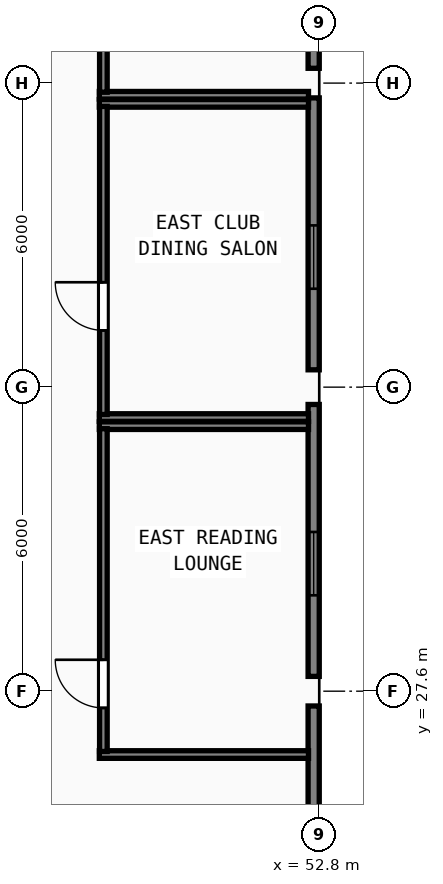
"""IFC4 building model, lengths in metres.
Left out: names, types, materials, properties, quantities, classifications, styles, units other than length and angle.
Written with IfcOpenShell. Run it as: python <this file> out.ifc"""

import sys

from ifc_helpers import new_model, si_unit, direction, frame, frame_2d, origin, origin_2d, place, context, subcontext, project, spatial, rectangle, hollow_rectangle, extrude, element, fill, save


model = new_model("IFC4")
c1 = context("Model", 3, precision=1e-05, world=origin(), true_north=direction((0.0, 1.0)))
c2 = subcontext(c1, "Body", "Model", "MODEL_VIEW")
j1 = project(units=[si_unit("LENGTHUNIT", "METRE"), si_unit("PLANEANGLEUNIT", "RADIAN")], contexts=[c1])
p1 = place(None, origin())
s1 = spatial("IfcSite", under=j1, at=p1, CompositionType="ELEMENT")
p2 = place(p1, origin())
s2 = spatial("IfcBuilding", under=s1, at=p2, CompositionType="ELEMENT")
p3 = place(p2, frame((0.0, 0.0, 282.2)))
s3 = spatial("IfcBuildingStorey", under=s2, at=p3, CompositionType="ELEMENT", Elevation=282.2)
p4 = place(p3, frame((52.8, 33.6, 0.0), z_axis=(0.0, 0.0, 1.0), x_axis=(1.0, 0.0, 0.0)))
e1 = element("IfcColumn", 1, at=p4, inside=s3, PredefinedType="COLUMN", context=c2, shape_type="SweptSolid", body=[
    extrude(hollow_rectangle(XDim=0.7, YDim=0.7, WallThickness=0.026, at=origin_2d()), origin(), (0.0, 0.0, 1.0), 3.9),
])
for number, where, z_axis, x_axis in (
    (2, (52.8, 27.6, 0.0), (0.0, 0.0, 1.0), (1.0, 0.0, 0.0)),
    (3, (52.8, 39.6, 0.0), (0.0, 0.0, 1.0), (1.0, 0.0, 0.0)),
):
    element("IfcColumn", number, at=place(p3, frame(where, z_axis=z_axis, x_axis=x_axis)), inside=s3, PredefinedType="COLUMN", context=c2, shape_type="SweptSolid", body=[
        extrude(hollow_rectangle(XDim=0.6, YDim=0.6, WallThickness=0.024, at=origin_2d()), origin(), (0.0, 0.0, 1.0), 3.9),
    ])
p5 = place(p3, frame((52.69, 21.942, 0.0), z_axis=(0.0, 0.0, 1.0), x_axis=(0.0, 1.0, 0.0)))
e4 = element("IfcWall", 4, at=p5, inside=s3, PredefinedType="SOLIDWALL", context=c2, shape_type="SweptSolid", body=[
    extrude(rectangle(XDim=5.366, YDim=0.22, at=frame_2d((2.683, 0.0))), origin(), (0.0, 0.0, 1.0), 3.365),
])
p6 = place(p5, frame((0.853, 0.0, 0.85)))
e5 = element("IfcOpeningElement", 5, at=p6, cuts=e4, PredefinedType="OPENING", context=c2, shape_type="SweptSolid", body=[
    extrude(rectangle(XDim=1.25, YDim=1.95, at=frame_2d((0.625, 0.975))), frame((0.0, 0.12, 0.0), z_axis=(0.0, -1.0, 0.0), x_axis=(1.0, 0.0, 0.0)), (0.0, 0.0, 1.0), 0.24),
])
p7 = place(p3, frame((52.69, 27.892, 0.0), z_axis=(0.0, 0.0, 1.0), x_axis=(0.0, 1.0, 0.0)))
e6 = element("IfcWall", 6, at=p7, inside=s3, PredefinedType="SOLIDWALL", context=c2, shape_type="SweptSolid", body=[
    extrude(rectangle(XDim=5.366, YDim=0.22, at=frame_2d((2.683, 0.0))), origin(), (0.0, 0.0, 1.0), 3.365),
])
p8 = place(p7, frame((1.6, 0.0, 0.85)))
e7 = element("IfcOpeningElement", 7, at=p8, cuts=e6, PredefinedType="OPENING", context=c2, shape_type="SweptSolid", body=[
    extrude(rectangle(XDim=1.25, YDim=1.95, at=frame_2d((0.625, 0.975))), frame((0.0, 0.12, 0.0), z_axis=(0.0, -1.0, 0.0), x_axis=(1.0, 0.0, 0.0)), (0.0, 0.0, 1.0), 0.24),
])
p9 = place(p3, frame((52.69, 33.942, 0.0), z_axis=(0.0, 0.0, 1.0), x_axis=(0.0, 1.0, 0.0)))
e8 = element("IfcWall", 8, at=p9, inside=s3, PredefinedType="SOLIDWALL", context=c2, shape_type="SweptSolid", body=[
    extrude(rectangle(XDim=5.366, YDim=0.22, at=frame_2d((2.683, 0.0))), origin(), (0.0, 0.0, 1.0), 3.365),
])
p10 = place(p9, frame((1.6, 0.0, 0.85)))
e9 = element("IfcOpeningElement", 9, at=p10, cuts=e8, PredefinedType="OPENING", context=c2, shape_type="SweptSolid", body=[
    extrude(rectangle(XDim=1.25, YDim=1.95, at=frame_2d((0.625, 0.975))), frame((0.0, 0.12, 0.0), z_axis=(0.0, -1.0, 0.0), x_axis=(1.0, 0.0, 0.0)), (0.0, 0.0, 1.0), 0.24),
])
p11 = place(p3, frame((52.69, 39.892, 0.0), z_axis=(0.0, 0.0, 1.0), x_axis=(0.0, 1.0, 0.0)))
e10 = element("IfcWall", 10, at=p11, inside=s3, PredefinedType="SOLIDWALL", context=c2, shape_type="SweptSolid", body=[
    extrude(rectangle(XDim=5.366, YDim=0.22, at=frame_2d((2.683, 0.0))), origin(), (0.0, 0.0, 1.0), 3.365),
])
p12 = place(p11, frame((1.6, 0.0, 0.85)))
e11 = element("IfcOpeningElement", 11, at=p12, cuts=e10, PredefinedType="OPENING", context=c2, shape_type="SweptSolid", body=[
    extrude(rectangle(XDim=1.25, YDim=1.95, at=frame_2d((0.625, 0.975))), frame((0.0, 0.12, 0.0), z_axis=(0.0, -1.0, 0.0), x_axis=(1.0, 0.0, 0.0)), (0.0, 0.0, 1.0), 0.24),
])
for number, where, z_axis, x_axis in (
    (12, (48.46, 39.2, 0.0), (0.0, 0.0, 1.0), (1.0, 0.0, 0.0)),
    (13, (48.46, 33.0, 0.0), (0.0, 0.0, 1.0), (1.0, 0.0, 0.0)),
):
    element("IfcWall", number, at=place(p3, frame(where, z_axis=z_axis, x_axis=x_axis)), inside=s3, PredefinedType="PARTITIONING", context=c2, shape_type="SweptSolid", body=[
        extrude(rectangle(XDim=4.128, YDim=0.15, at=frame_2d((2.064, 0.0))), origin(), (0.0, 0.0, 1.0), 3.72),
    ])
p13 = place(p3, frame((48.54, 33.06, 0.0), z_axis=(0.0, 0.0, 1.0), x_axis=(0.0, 1.0, 0.0)))
e14 = element("IfcWall", 14, at=p13, inside=s3, PredefinedType="PARTITIONING", context=c2, shape_type="SweptSolid", body=[
    extrude(rectangle(XDim=6.08, YDim=0.15, at=frame_2d((3.04, 0.0))), origin(), (0.0, 0.0, 1.0), 3.72),
])
p14 = place(p13, frame((1.66, 0.0, 0.0)))
e15 = element("IfcOpeningElement", 15, at=p14, cuts=e14, PredefinedType="OPENING", context=c2, shape_type="SweptSolid", body=[
    extrude(rectangle(XDim=0.95, YDim=2.12, at=frame_2d((0.475, 1.06))), frame((0.0, 0.085, 0.0), z_axis=(0.0, -1.0, 0.0), x_axis=(1.0, 0.0, 0.0)), (0.0, 0.0, 1.0), 0.17),
])
p15 = place(p3, frame((48.46, 39.36, 0.0), z_axis=(0.0, 0.0, 1.0), x_axis=(1.0, 0.0, 0.0)))
e16 = element("IfcWall", 16, at=p15, inside=s3, PredefinedType="PARTITIONING", context=c2, shape_type="SweptSolid", body=[
    extrude(rectangle(XDim=4.128, YDim=0.15, at=frame_2d((2.064, 0.0))), origin(), (0.0, 0.0, 1.0), 3.72),
])
p16 = place(p3, frame((48.54, 39.42, 0.0), z_axis=(0.0, 0.0, 1.0), x_axis=(0.0, 1.0, 0.0)))
e17 = element("IfcWall", 17, at=p16, inside=s3, PredefinedType="PARTITIONING", context=c2, shape_type="SweptSolid", body=[
    extrude(rectangle(XDim=8.02, YDim=0.15, at=frame_2d((4.01, 0.0))), origin(), (0.0, 0.0, 1.0), 3.72),
])
p17 = place(p16, frame((1.86, 0.0, 0.0)))
e18 = element("IfcOpeningElement", 18, at=p17, cuts=e17, PredefinedType="OPENING", context=c2, shape_type="SweptSolid", body=[
    extrude(rectangle(XDim=0.95, YDim=2.12, at=frame_2d((0.475, 1.06))), frame((0.0, 0.085, 0.0), z_axis=(0.0, -1.0, 0.0), x_axis=(1.0, 0.0, 0.0)), (0.0, 0.0, 1.0), 0.17),
])
for number, where, z_axis, x_axis in (
    (19, (48.46, 32.84, 0.0), (0.0, 0.0, 1.0), (1.0, 0.0, 0.0)),
    (20, (48.46, 26.35, 0.0), (0.0, 0.0, 1.0), (1.0, 0.0, 0.0)),
):
    element("IfcWall", number, at=place(p3, frame(where, z_axis=z_axis, x_axis=x_axis)), inside=s3, PredefinedType="PARTITIONING", context=c2, shape_type="SweptSolid", body=[
        extrude(rectangle(XDim=4.128, YDim=0.15, at=frame_2d((2.064, 0.0))), origin(), (0.0, 0.0, 1.0), 3.72),
    ])
p18 = place(p3, frame((48.54, 26.41, 0.0), z_axis=(0.0, 0.0, 1.0), x_axis=(0.0, 1.0, 0.0)))
e21 = element("IfcWall", 21, at=p18, inside=s3, PredefinedType="PARTITIONING", context=c2, shape_type="SweptSolid", body=[
    extrude(rectangle(XDim=6.37, YDim=0.15, at=frame_2d((3.185, 0.0))), origin(), (0.0, 0.0, 1.0), 3.72),
])
p19 = place(p18, frame((0.86, 0.0, 0.0)))
e22 = element("IfcOpeningElement", 22, at=p19, cuts=e21, PredefinedType="OPENING", context=c2, shape_type="SweptSolid", body=[
    extrude(rectangle(XDim=0.95, YDim=2.12, at=frame_2d((0.475, 1.06))), frame((0.0, 0.085, 0.0), z_axis=(0.0, -1.0, 0.0), x_axis=(1.0, 0.0, 0.0)), (0.0, 0.0, 1.0), 0.17),
])
p20 = place(p8, origin())
e23 = element("IfcWindow", 23, at=p20, inside=s3, PartitioningType="SINGLE_PANEL", PredefinedType="WINDOW", context=c2, shape_type="SweptSolid", body=[
    extrude(rectangle(XDim=1.25, YDim=1.95, at=frame_2d((0.625, 0.975))), frame((0.0, 0.03, 0.0), z_axis=(0.0, -1.0, 0.0), x_axis=(1.0, 0.0, 0.0)), (0.0, 0.0, 1.0), 0.06),
])
fill(e7, e23)
p21 = place(p10, origin())
e24 = element("IfcWindow", 24, at=p21, inside=s3, PartitioningType="SINGLE_PANEL", PredefinedType="WINDOW", context=c2, shape_type="SweptSolid", body=[
    extrude(rectangle(XDim=1.25, YDim=1.95, at=frame_2d((0.625, 0.975))), frame((0.0, 0.03, 0.0), z_axis=(0.0, -1.0, 0.0), x_axis=(1.0, 0.0, 0.0)), (0.0, 0.0, 1.0), 0.06),
])
fill(e9, e24)
p22 = place(p14, origin())
e25 = element("IfcDoor", 25, at=p22, inside=s3, OperationType="SINGLE_SWING_RIGHT", PredefinedType="DOOR", context=c2, shape_type="SweptSolid", body=[
    extrude(rectangle(XDim=0.95, YDim=2.12, at=frame_2d((0.475, 1.06))), frame((0.0, 0.025, 0.0), z_axis=(0.0, -1.0, 0.0), x_axis=(1.0, 0.0, 0.0)), (0.0, 0.0, 1.0), 0.05),
])
fill(e15, e25)
p23 = place(p19, origin())
e26 = element("IfcDoor", 26, at=p23, inside=s3, OperationType="SINGLE_SWING_RIGHT", PredefinedType="DOOR", context=c2, shape_type="SweptSolid", body=[
    extrude(rectangle(XDim=0.95, YDim=2.12, at=frame_2d((0.475, 1.06))), frame((0.0, 0.025, 0.0), z_axis=(0.0, -1.0, 0.0), x_axis=(1.0, 0.0, 0.0)), (0.0, 0.0, 1.0), 0.05),
])
fill(e22, e26)
save(model, sys.argv[1])
